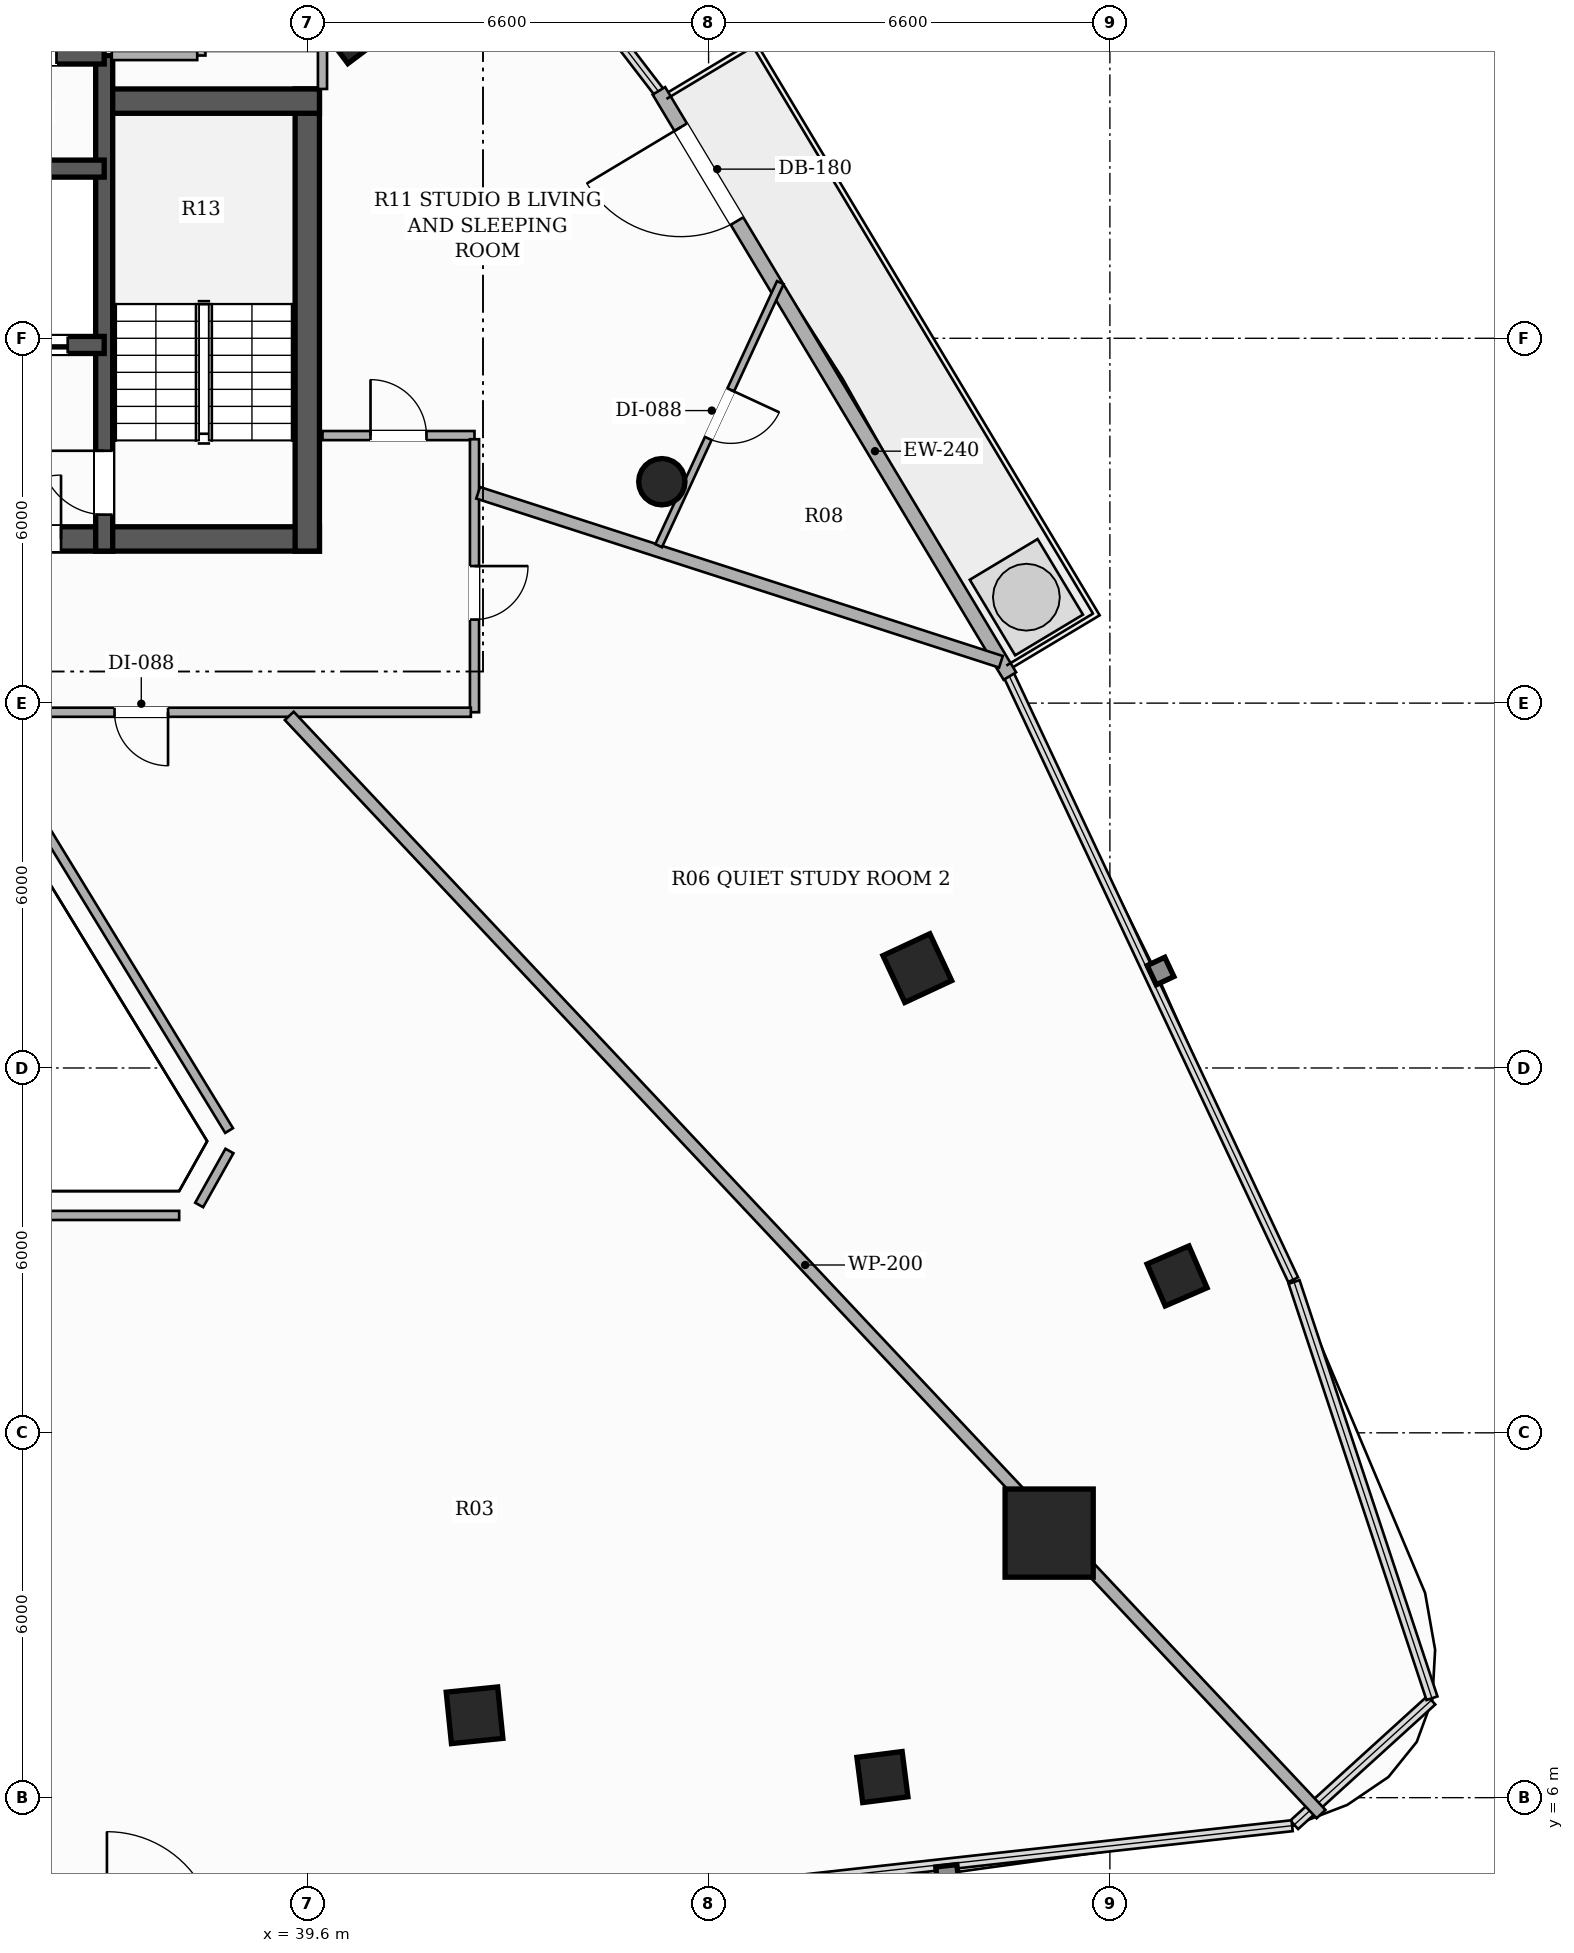
"""IFC4 building model, lengths in metres.
Left out: names, types, materials, properties, quantities, classifications, styles, units other than length and angle.
Written with IfcOpenShell. Run it as: python <this file> out.ifc"""

import sys

from ifc_helpers import new_model, si_unit, direction, frame, frame_2d, origin, origin_2d, place, context, subcontext, project, spatial, rectangle, hollow_rectangle, hollow_circle, extrude, element, fill, save


model = new_model("IFC4")
c1 = context("Model", 3, precision=1e-05, world=origin(), true_north=direction((0.0, 1.0)))
c2 = subcontext(c1, "Body", "Model", "MODEL_VIEW")
j1 = project(units=[si_unit("LENGTHUNIT", "METRE"), si_unit("PLANEANGLEUNIT", "RADIAN")], contexts=[c1])
p1 = place(None, origin())
s1 = spatial("IfcSite", under=j1, at=p1, CompositionType="ELEMENT")
p2 = place(p1, origin())
s2 = spatial("IfcBuilding", under=s1, at=p2, CompositionType="ELEMENT")
p3 = place(p2, frame((0.0, 0.0, 153.95)))
s3 = spatial("IfcBuildingStorey", under=s2, at=p3, CompositionType="ELEMENT", Elevation=153.95)
p4 = place(p3, frame((26.2, 26.7, 0.0), z_axis=(0.0, 0.0, 1.0), x_axis=(1.0, 0.0, 0.0)))
e1 = element("IfcWall", 1, at=p4, inside=s3, PredefinedType="SHEAR", context=c2, shape_type="SweptSolid", body=[
    extrude(rectangle(XDim=13.6, YDim=0.4, at=frame_2d((6.8, 0.0))), origin(), (0.0, 0.0, 1.0), 3.3),
])
p5 = place(p4, frame((4.35, 0.0, 0.0)))
e2 = element("IfcOpeningElement", 2, at=p5, cuts=e1, PredefinedType="OPENING", context=c2, shape_type="SweptSolid", body=[
    extrude(rectangle(XDim=1.05, YDim=2.15, at=frame_2d((0.525, 1.075))), frame((0.0, 0.21, 0.0), z_axis=(0.0, -1.0, 0.0), x_axis=(1.0, 0.0, 0.0)), (0.0, 0.0, 1.0), 0.42),
])
p6 = place(p4, frame((8.3, 0.0, 0.0)))
e3 = element("IfcOpeningElement", 3, at=p6, cuts=e1, PredefinedType="OPENING", context=c2, shape_type="SweptSolid", body=[
    extrude(rectangle(XDim=1.05, YDim=2.15, at=frame_2d((0.525, 1.075))), frame((0.0, 0.21, 0.0), z_axis=(0.0, -1.0, 0.0), x_axis=(1.0, 0.0, 0.0)), (0.0, 0.0, 1.0), 0.42),
])
p7 = place(p3, frame((39.6, 26.5, 0.0), z_axis=(0.0, 0.0, 1.0), x_axis=(0.0, 1.0, 0.0)))
e4 = element("IfcWall", 4, at=p7, inside=s3, PredefinedType="SHEAR", context=c2, shape_type="SweptSolid", body=[
    extrude(rectangle(XDim=7.6, YDim=0.4, at=frame_2d((3.8, 0.0))), origin(), (0.0, 0.0, 1.0), 3.3),
])
p8 = place(p3, frame((36.12, 33.9, 0.0), z_axis=(0.0, 0.0, 1.0), x_axis=(1.0, 0.0, 0.0)))
e5 = element("IfcWall", 5, at=p8, inside=s3, PredefinedType="SHEAR", context=c2, shape_type="SweptSolid", body=[
    extrude(rectangle(XDim=3.68, YDim=0.4, at=frame_2d((1.84, 0.0))), origin(), (0.0, 0.0, 1.0), 3.3),
])
p9 = place(p3, frame((36.26, 26.5, 0.0), z_axis=(0.0, 0.0, 1.0), x_axis=(0.0, 1.0, 0.0)))
e6 = element("IfcWall", 6, at=p9, inside=s3, PredefinedType="SHEAR", context=c2, shape_type="SweptSolid", body=[
    extrude(rectangle(XDim=8.15, YDim=0.28, at=frame_2d((4.075, 0.0))), origin(), (0.0, 0.0, 1.0), 3.3),
])
p10 = place(p9, frame((0.6, 0.0, 0.0)))
e7 = element("IfcOpeningElement", 7, at=p10, cuts=e6, PredefinedType="OPENING", context=c2, shape_type="SweptSolid", body=[
    extrude(rectangle(XDim=1.05, YDim=2.15, at=frame_2d((0.525, 1.075))), frame((0.0, 0.15, 0.0), z_axis=(0.0, -1.0, 0.0), x_axis=(1.0, 0.0, 0.0)), (0.0, 0.0, 1.0), 0.3),
])
p11 = place(p3, frame((36.26, 29.89, 0.0), z_axis=(0.0, 0.0, 1.0), x_axis=(-1.0, 0.0, 0.0)))
e8 = element("IfcWall", 8, at=p11, inside=s3, PredefinedType="SHEAR", context=c2, shape_type="SweptSolid", body=[
    extrude(rectangle(XDim=6.52, YDim=0.28, at=frame_2d((3.26, 0.0))), origin(), (0.0, 0.0, 1.0), 3.3),
])
p12 = place(p11, frame((4.875, 0.0, 0.0)))
e9 = element("IfcOpeningElement", 9, at=p12, cuts=e8, PredefinedType="OPENING", context=c2, shape_type="SweptSolid", body=[
    extrude(rectangle(XDim=1.1, YDim=2.2, at=frame_2d((0.55, 1.1))), frame((0.0, 0.15, 0.0), z_axis=(0.0, -1.0, 0.0), x_axis=(1.0, 0.0, 0.0)), (0.0, 0.0, 1.0), 0.3),
])
p13 = place(p11, frame((2.875, 0.0, 0.0)))
e10 = element("IfcOpeningElement", 10, at=p13, cuts=e8, PredefinedType="OPENING", context=c2, shape_type="SweptSolid", body=[
    extrude(rectangle(XDim=1.1, YDim=2.2, at=frame_2d((0.55, 1.1))), frame((0.0, 0.15, 0.0), z_axis=(0.0, -1.0, 0.0), x_axis=(1.0, 0.0, 0.0)), (0.0, 0.0, 1.0), 0.3),
])
p14 = place(p11, frame((0.6, 0.0, 0.0)))
e11 = element("IfcOpeningElement", 11, at=p14, cuts=e8, PredefinedType="OPENING", context=c2, shape_type="SweptSolid", body=[
    extrude(rectangle(XDim=1.3, YDim=2.2, at=frame_2d((0.65, 1.1))), frame((0.0, 0.15, 0.0), z_axis=(0.0, -1.0, 0.0), x_axis=(1.0, 0.0, 0.0)), (0.0, 0.0, 1.0), 0.3),
])
p15 = place(p3, frame((29.74, 32.79, 0.0), z_axis=(0.0, 0.0, 1.0), x_axis=(1.0, 0.0, 0.0)))
e12 = element("IfcWall", 12, at=p15, inside=s3, PredefinedType="SHEAR", context=c2, shape_type="SweptSolid", body=[
    extrude(rectangle(XDim=6.52, YDim=0.28, at=frame_2d((3.26, 0.0))), origin(), (0.0, 0.0, 1.0), 3.3),
])
p16 = place(p3, frame((29.74, 34.65, 0.0), z_axis=(0.0, 0.0, 1.0), x_axis=(1.0, 0.0, 0.0)))
e13 = element("IfcWall", 13, at=p16, inside=s3, PredefinedType="SHEAR", context=c2, shape_type="SweptSolid", body=[
    extrude(rectangle(XDim=6.52, YDim=0.28, at=frame_2d((3.26, 0.0))), origin(), (0.0, 0.0, 1.0), 3.3),
])
p17 = place(p16, frame((0.765, 0.0, 0.0)))
e14 = element("IfcOpeningElement", 14, at=p17, cuts=e13, PredefinedType="OPENING", context=c2, shape_type="SweptSolid", body=[
    extrude(rectangle(XDim=0.82, YDim=2.1, at=frame_2d((0.41, 1.05))), frame((0.0, 0.15, 0.0), z_axis=(0.0, -1.0, 0.0), x_axis=(1.0, 0.0, 0.0)), (0.0, 0.0, 1.0), 0.3),
])
p18 = place(p16, frame((2.84, 0.0, 0.0)))
e15 = element("IfcOpeningElement", 15, at=p18, cuts=e13, PredefinedType="OPENING", context=c2, shape_type="SweptSolid", body=[
    extrude(rectangle(XDim=0.82, YDim=2.1, at=frame_2d((0.41, 1.05))), frame((0.0, 0.15, 0.0), z_axis=(0.0, -1.0, 0.0), x_axis=(1.0, 0.0, 0.0)), (0.0, 0.0, 1.0), 0.3),
])
p19 = place(p16, frame((4.915, 0.0, 0.0)))
e16 = element("IfcOpeningElement", 16, at=p19, cuts=e13, PredefinedType="OPENING", context=c2, shape_type="SweptSolid", body=[
    extrude(rectangle(XDim=0.82, YDim=2.1, at=frame_2d((0.41, 1.05))), frame((0.0, 0.15, 0.0), z_axis=(0.0, -1.0, 0.0), x_axis=(1.0, 0.0, 0.0)), (0.0, 0.0, 1.0), 0.3),
])
p20 = place(p3, frame((51.801, 10.351, 0.0), z_axis=(0.0, 0.0, 1.0), x_axis=(1.0, 0.0, 0.0)))
e17 = element("IfcColumn", 17, at=p20, inside=s3, PredefinedType="COLUMN", context=c2, shape_type="SweptSolid", body=[
    extrude(hollow_rectangle(XDim=1.45, YDim=1.45, WallThickness=0.045, at=origin_2d()), origin(), (0.0, 0.0, 1.0), 3.3),
])
for number, where, z_axis, x_axis in (
    (18, (42.351, 7.355, 0.0), (0.0, 0.0, 1.0), (0.995, 0.101, 0.0)),
    (19, (49.633, 19.642, 0.0), (0.0, 0.0, 1.0), (-0.423, 0.906, 0.0)),
):
    element("IfcColumn", number, at=place(p3, frame(where, z_axis=z_axis, x_axis=x_axis)), inside=s3, PredefinedType="COLUMN", context=c2, shape_type="SweptSolid", body=[
        extrude(hollow_rectangle(XDim=0.85, YDim=0.85, WallThickness=0.028, at=origin_2d()), origin(), (0.0, 0.0, 1.0), 3.3),
    ])
p21 = place(p3, frame((45.431, 27.641, 0.0), z_axis=(0.0, 0.0, 1.0), x_axis=(1.0, 0.0, 0.0)))
e20 = element("IfcColumn", 20, at=p21, inside=s3, PredefinedType="COLUMN", context=c2, shape_type="SweptSolid", body=[
    extrude(hollow_circle(Radius=0.381, WallThickness=0.022, at=origin_2d()), origin(), (0.0, 0.0, 1.0), 3.3),
])
p22 = place(p3, frame((40.352, 35.113, 0.0), z_axis=(0.0, 0.0, 1.0), x_axis=(-0.600420225326, 0.799684658487, 0.0)))
e21 = element("IfcColumn", 21, at=p22, inside=s3, PredefinedType="COLUMN", context=c2, shape_type="SweptSolid", body=[
    extrude(hollow_rectangle(XDim=0.85, YDim=0.85, WallThickness=0.028, at=origin_2d()), origin(), (0.0, 0.0, 1.0), 3.3),
])
for number, where, z_axis, x_axis in (
    (22, (49.059, 6.339, 0.0), (0.0, 0.0, 1.0), (0.992, 0.127, 0.0)),
    (23, (53.905, 14.58, 0.0), (0.0, 0.0, 1.0), (-0.397, 0.918, 0.0)),
):
    element("IfcColumn", number, at=place(p3, frame(where, z_axis=z_axis, x_axis=x_axis)), inside=s3, PredefinedType="COLUMN", context=c2, shape_type="SweptSolid", body=[
        extrude(hollow_rectangle(XDim=0.75, YDim=0.75, WallThickness=0.025, at=origin_2d()), origin(), (0.0, 0.0, 1.0), 3.3),
    ])
p23 = place(p3, frame((51.155, 24.445, 0.0), z_axis=(0.0, 0.0, 1.0), x_axis=(-0.514335781973, 0.857588889493, 0.0)))
e24 = element("IfcWall", 24, at=p23, inside=s3, PredefinedType="SOLIDWALL", context=c2, shape_type="SweptSolid", body=[
    extrude(rectangle(XDim=11.222, YDim=0.24, at=frame_2d((5.611, 0.0))), origin(), (0.0, 0.0, 1.0), 2.624),
])
p24 = place(p23, frame((8.725, 0.0, 0.0)))
e25 = element("IfcOpeningElement", 25, at=p24, cuts=e24, PredefinedType="OPENING", context=c2, shape_type="SweptSolid", body=[
    extrude(rectangle(XDim=1.8, YDim=2.2, at=frame_2d((0.9, 1.1))), frame((0.0, 0.13, 0.0), z_axis=(0.0, -1.0, 0.0), x_axis=(1.0, 0.0, 0.0)), (0.0, 0.0, 1.0), 0.26),
])
p25 = place(p3, frame((37.85, 34.65, 0.0), z_axis=(0.0, 0.0, 1.0), x_axis=(0.0, 1.0, 0.0)))
e26 = element("IfcWall", 26, at=p25, inside=s3, PredefinedType="PARTITIONING", context=c2, shape_type="SweptSolid", body=[
    extrude(rectangle(XDim=2.26, YDim=0.15, at=frame_2d((1.13, 0.0))), origin(), (0.0, 0.0, 1.0), 3.06),
])
p26 = place(p3, frame((36.385, 34.65, 0.0), z_axis=(0.0, 0.0, 1.0), x_axis=(1.0, 0.0, 0.0)))
e27 = element("IfcWall", 27, at=p26, inside=s3, PredefinedType="PARTITIONING", context=c2, shape_type="SweptSolid", body=[
    extrude(rectangle(XDim=1.405, YDim=0.15, at=frame_2d((0.703, 0.0))), origin(), (0.0, 0.0, 1.0), 2.425),
])
p27 = place(p3, frame((39.85, 28.4, 0.0), z_axis=(0.0, 0.0, 1.0), x_axis=(1.0, 0.0, 0.0)))
e28 = element("IfcWall", 28, at=p27, inside=s3, PredefinedType="PARTITIONING", context=c2, shape_type="SweptSolid", body=[
    extrude(rectangle(XDim=2.5, YDim=0.15, at=frame_2d((1.25, 0.0))), origin(), (0.0, 0.0, 1.0), 2.721),
])
p28 = place(p27, frame((0.79, 0.0, 0.0)))
e29 = element("IfcOpeningElement", 29, at=p28, cuts=e28, PredefinedType="OPENING", context=c2, shape_type="SweptSolid", body=[
    extrude(rectangle(XDim=0.92, YDim=2.15, at=frame_2d((0.46, 1.075))), frame((0.0, 0.085, 0.0), z_axis=(0.0, -1.0, 0.0), x_axis=(1.0, 0.0, 0.0)), (0.0, 0.0, 1.0), 0.17),
])
p29 = place(p3, frame((42.35, 28.34, 0.0), z_axis=(0.0, 0.0, 1.0), x_axis=(0.0, -1.0, 0.0)))
e30 = element("IfcWall", 30, at=p29, inside=s3, PredefinedType="PARTITIONING", context=c2, shape_type="SweptSolid", body=[
    extrude(rectangle(XDim=4.49, YDim=0.15, at=frame_2d((2.245, 0.0))), origin(), (0.0, 0.0, 1.0), 2.721),
])
p30 = place(p29, frame((2.086, 0.0, 0.0)))
e31 = element("IfcOpeningElement", 31, at=p30, cuts=e30, PredefinedType="OPENING", context=c2, shape_type="SweptSolid", body=[
    extrude(rectangle(XDim=0.88, YDim=2.1, at=frame_2d((0.44, 1.05))), frame((0.0, 0.085, 0.0), z_axis=(0.0, -1.0, 0.0), x_axis=(1.0, 0.0, 0.0)), (0.0, 0.0, 1.0), 0.17),
])
p31 = place(p3, frame((42.29, 23.85, 0.0), z_axis=(0.0, 0.0, 1.0), x_axis=(-1.0, 0.0, 0.0)))
e32 = element("IfcWall", 32, at=p31, inside=s3, PredefinedType="PARTITIONING", context=c2, shape_type="SweptSolid", body=[
    extrude(rectangle(XDim=8.179, YDim=0.15, at=frame_2d((4.089, 0.0))), origin(), (0.0, 0.0, 1.0), 2.492),
])
p32 = place(p31, frame((4.98, 0.0, 0.0)))
e33 = element("IfcOpeningElement", 33, at=p32, cuts=e32, PredefinedType="OPENING", context=c2, shape_type="SweptSolid", body=[
    extrude(rectangle(XDim=0.88, YDim=2.1, at=frame_2d((0.44, 1.05))), frame((0.0, 0.085, 0.0), z_axis=(0.0, -1.0, 0.0), x_axis=(1.0, 0.0, 0.0)), (0.0, 0.0, 1.0), 0.17),
])
p33 = place(p3, frame((39.85, 34.74, 0.0), z_axis=(0.0, 0.0, 1.0), x_axis=(0.0, -1.0, 0.0)))
e34 = element("IfcWall", 34, at=p33, inside=s3, PredefinedType="PARTITIONING", context=c2, shape_type="SweptSolid", body=[
    extrude(rectangle(XDim=0.64, YDim=0.15, at=frame_2d((0.32, 0.0))), origin(), (0.0, 0.0, 1.0), 2.721),
])
p34 = place(p3, frame((34.147, 23.79, 0.0), z_axis=(0.0, 0.0, 1.0), x_axis=(0.521429001816, -0.853294671298, 0.0)))
e35 = element("IfcWall", 35, at=p34, inside=s3, PredefinedType="PARTITIONING", context=c2, shape_type="SweptSolid", body=[
    extrude(rectangle(XDim=7.991, YDim=0.15, at=frame_2d((3.996, 0.0))), origin(), (0.0, 0.0, 1.0), 2.721),
])
p35 = place(p3, frame((38.32, 16.635, 0.0), z_axis=(0.0, 0.0, 1.0), x_axis=(-0.489202035948, -0.872170492521, 0.0)))
e36 = element("IfcWall", 36, at=p35, inside=s3, PredefinedType="PARTITIONING", context=c2, shape_type="SweptSolid", body=[
    extrude(rectangle(XDim=1.018, YDim=0.15, at=frame_2d((0.509, 0.0))), origin(), (0.0, 0.0, 1.0), 3.06),
])
p36 = place(p3, frame((37.493, 15.575, 0.0), z_axis=(0.0, 0.0, 1.0), x_axis=(-1.0, 0.0, 0.0)))
e37 = element("IfcWall", 37, at=p36, inside=s3, PredefinedType="PARTITIONING", context=c2, shape_type="SweptSolid", body=[
    extrude(rectangle(XDim=8.987, YDim=0.15, at=frame_2d((4.493, 0.0))), origin(), (0.0, 0.0, 1.0), 2.721),
])
p37 = place(p3, frame((39.304, 23.79, 0.0), z_axis=(0.0, 0.0, 1.0), x_axis=(0.684750154022, -0.72877789934, 0.0)))
e38 = element("IfcWall", 38, at=p37, inside=s3, PredefinedType="PARTITIONING", context=c2, shape_type="SweptSolid", body=[
    extrude(rectangle(XDim=24.781, YDim=0.2, at=frame_2d((12.391, 0.0))), origin(), (0.0, 0.0, 1.0), 2.413),
])
p38 = place(p3, frame((42.41, 27.459, 0.0), z_axis=(0.0, 0.0, 1.0), x_axis=(0.951531988225, -0.307549793343, 0.0)))
e39 = element("IfcWall", 39, at=p38, inside=s3, PredefinedType="PARTITIONING", context=c2, shape_type="SweptSolid", body=[
    extrude(rectangle(XDim=9.036, YDim=0.2, at=frame_2d((4.518, 0.0))), origin(), (0.0, 0.0, 1.0), 2.413),
])
p39 = place(p3, frame((47.38, 30.915, 0.0), z_axis=(0.0, 0.0, 1.0), x_axis=(-0.419818119852, -0.907608255936, 0.0)))
e40 = element("IfcWall", 40, at=p39, inside=s3, PredefinedType="PARTITIONING", context=c2, shape_type="SweptSolid", body=[
    extrude(rectangle(XDim=4.766, YDim=0.12, at=frame_2d((2.383, 0.0))), origin(), (0.0, 0.0, 1.0), 2.413),
])
p40 = place(p39, frame((1.943, 0.0, 0.0)))
e41 = element("IfcOpeningElement", 41, at=p40, cuts=e40, PredefinedType="OPENING", context=c2, shape_type="SweptSolid", body=[
    extrude(rectangle(XDim=0.88, YDim=2.1, at=frame_2d((0.44, 1.05))), frame((0.0, 0.07, 0.0), z_axis=(0.0, -1.0, 0.0), x_axis=(1.0, 0.0, 0.0)), (0.0, 0.0, 1.0), 0.14),
])
p41 = place(p24, origin())
e42 = element("IfcDoor", 42, at=p41, inside=s3, OperationType="SINGLE_SWING_RIGHT", PredefinedType="DOOR", context=c2, shape_type="SweptSolid", body=[
    extrude(rectangle(XDim=1.8, YDim=2.2, at=frame_2d((0.9, 1.1))), frame((0.0, 0.025, 0.0), z_axis=(0.0, -1.0, 0.0), x_axis=(1.0, 0.0, 0.0)), (0.0, 0.0, 1.0), 0.05),
])
fill(e25, e42)
p42 = place(p10, origin())
e43 = element("IfcDoor", 43, at=p42, inside=s3, OperationType="SINGLE_SWING_RIGHT", PredefinedType="DOOR", context=c2, shape_type="SweptSolid", body=[
    extrude(rectangle(XDim=1.05, YDim=2.15, at=frame_2d((0.525, 1.075))), frame((0.0, 0.025, 0.0), z_axis=(0.0, -1.0, 0.0), x_axis=(1.0, 0.0, 0.0)), (0.0, 0.0, 1.0), 0.05),
])
fill(e7, e43)
p43 = place(p6, origin())
e44 = element("IfcDoor", 44, at=p43, inside=s3, OperationType="SINGLE_SWING_RIGHT", PredefinedType="DOOR", context=c2, shape_type="SweptSolid", body=[
    extrude(rectangle(XDim=1.05, YDim=2.15, at=frame_2d((0.525, 1.075))), frame((0.0, 0.025, 0.0), z_axis=(0.0, -1.0, 0.0), x_axis=(1.0, 0.0, 0.0)), (0.0, 0.0, 1.0), 0.05),
])
fill(e3, e44)
p44 = place(p14, origin())
e45 = element("IfcDoor", 45, at=p44, inside=s3, OperationType="DOUBLE_DOOR_SLIDING", PredefinedType="DOOR", context=c2, shape_type="SweptSolid", body=[
    extrude(rectangle(XDim=1.3, YDim=2.2, at=frame_2d((0.65, 1.1))), frame((0.0, 0.025, 0.0), z_axis=(0.0, -1.0, 0.0), x_axis=(1.0, 0.0, 0.0)), (0.0, 0.0, 1.0), 0.05),
])
fill(e11, e45)
p45 = place(p19, origin())
e46 = element("IfcDoor", 46, at=p45, inside=s3, OperationType="SINGLE_SWING_LEFT", PredefinedType="DOOR", context=c2, shape_type="SweptSolid", body=[
    extrude(rectangle(XDim=0.82, YDim=2.1, at=frame_2d((0.41, 1.05))), frame((0.0, 0.025, 0.0), z_axis=(0.0, -1.0, 0.0), x_axis=(1.0, 0.0, 0.0)), (0.0, 0.0, 1.0), 0.05),
])
fill(e16, e46)
p46 = place(p32, origin())
e47 = element("IfcDoor", 47, at=p46, inside=s3, OperationType="SINGLE_SWING_LEFT", PredefinedType="DOOR", context=c2, shape_type="SweptSolid", body=[
    extrude(rectangle(XDim=0.88, YDim=2.1, at=frame_2d((0.44, 1.05))), frame((0.0, 0.025, 0.0), z_axis=(0.0, -1.0, 0.0), x_axis=(1.0, 0.0, 0.0)), (0.0, 0.0, 1.0), 0.05),
])
fill(e33, e47)
p47 = place(p30, origin())
e48 = element("IfcDoor", 48, at=p47, inside=s3, OperationType="SINGLE_SWING_LEFT", PredefinedType="DOOR", context=c2, shape_type="SweptSolid", body=[
    extrude(rectangle(XDim=0.88, YDim=2.1, at=frame_2d((0.44, 1.05))), frame((0.0, 0.025, 0.0), z_axis=(0.0, -1.0, 0.0), x_axis=(1.0, 0.0, 0.0)), (0.0, 0.0, 1.0), 0.05),
])
fill(e31, e48)
p48 = place(p28, origin())
e49 = element("IfcDoor", 49, at=p48, inside=s3, OperationType="SINGLE_SWING_LEFT", PredefinedType="DOOR", context=c2, shape_type="SweptSolid", body=[
    extrude(rectangle(XDim=0.92, YDim=2.15, at=frame_2d((0.46, 1.075))), frame((0.0, 0.025, 0.0), z_axis=(0.0, -1.0, 0.0), x_axis=(1.0, 0.0, 0.0)), (0.0, 0.0, 1.0), 0.05),
])
fill(e29, e49)
p49 = place(p40, origin())
e50 = element("IfcDoor", 50, at=p49, inside=s3, OperationType="SINGLE_SWING_LEFT", PredefinedType="DOOR", context=c2, shape_type="SweptSolid", body=[
    extrude(rectangle(XDim=0.88, YDim=2.1, at=frame_2d((0.44, 1.05))), frame((0.0, 0.025, 0.0), z_axis=(0.0, -1.0, 0.0), x_axis=(1.0, 0.0, 0.0)), (0.0, 0.0, 1.0), 0.05),
])
fill(e41, e50)
save(model, sys.argv[1])
